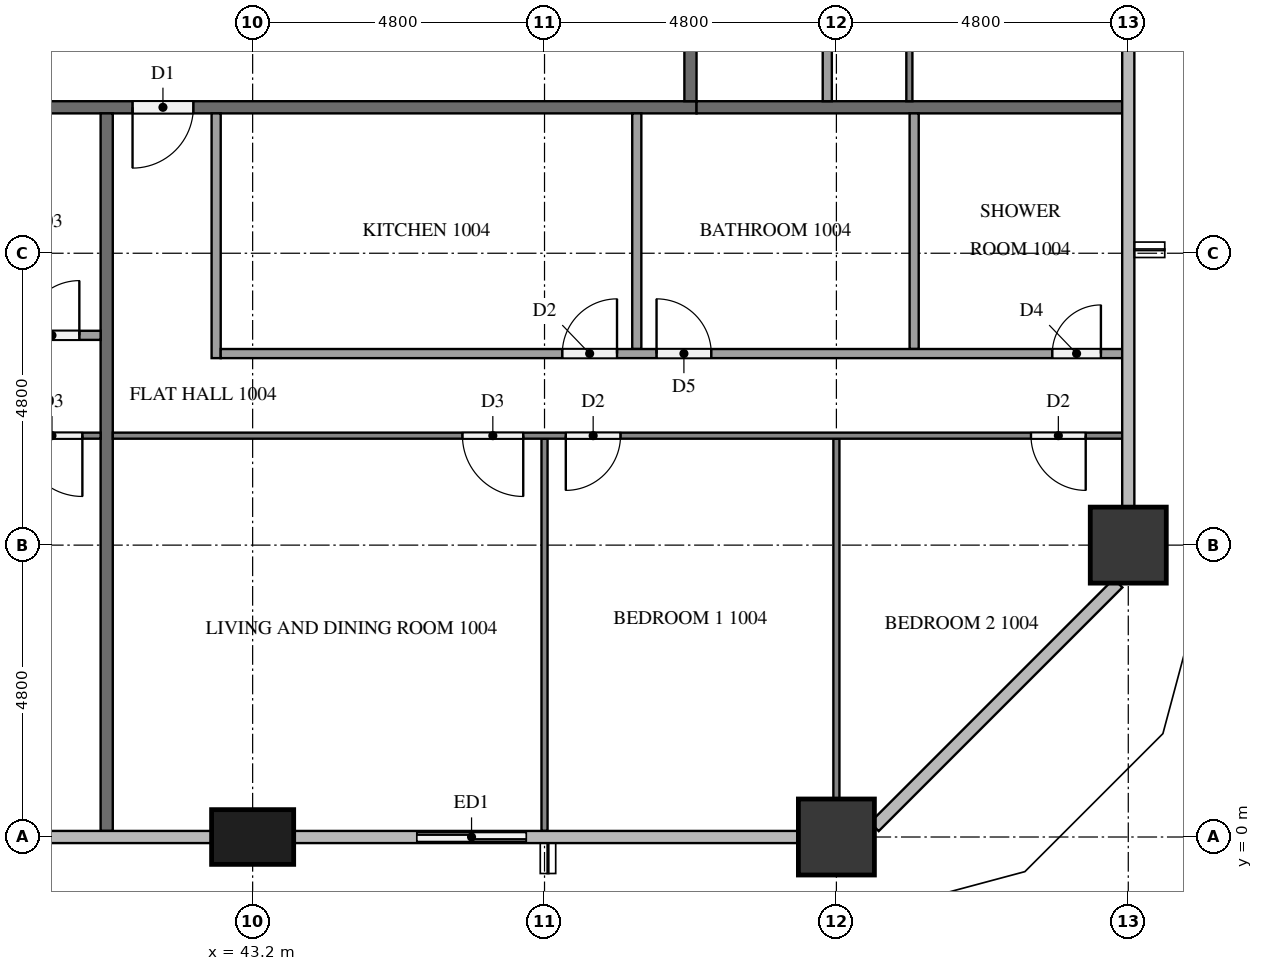
"""IFC4 building model, lengths in metres.
Left out: names, types, materials, properties, quantities, classifications, styles, units other than length and angle.
Written with IfcOpenShell. Run it as: python <this file> out.ifc"""

import sys

from ifc_helpers import new_model, si_unit, direction, frame, frame_2d, origin, origin_2d, place, context, subcontext, project, spatial, rectangle, extrude, element, fill, save


model = new_model("IFC4")
c1 = context("Model", 3, precision=1e-05, world=origin(), true_north=direction((0.0, 1.0)))
c2 = subcontext(c1, "Body", "Model", "MODEL_VIEW")
j1 = project(units=[si_unit("LENGTHUNIT", "METRE"), si_unit("PLANEANGLEUNIT", "RADIAN")], contexts=[c1])
p1 = place(None, origin())
s1 = spatial("IfcSite", under=j1, at=p1, CompositionType="ELEMENT")
p2 = place(p1, origin())
s2 = spatial("IfcBuilding", under=s1, at=p2, CompositionType="ELEMENT")
p3 = place(p2, frame((0.0, 0.0, 43.4)))
s3 = spatial("IfcBuildingStorey", under=s2, at=p3, CompositionType="ELEMENT", Elevation=43.4)
p4 = place(p3, frame((43.2, 0.0, 0.0), z_axis=(0.0, 0.0, 1.0), x_axis=(1.0, 0.0, 0.0)))
e1 = element("IfcColumn", 1, at=p4, inside=s3, PredefinedType="COLUMN", context=c2, shape_type="SweptSolid", body=[
    extrude(rectangle(XDim=1.35, YDim=0.9, at=origin_2d()), origin(), (0.0, 0.0, 1.0), 3.2),
])
for number, where, z_axis, x_axis in (
    (2, (52.8, 0.0, 0.0), (0.0, 0.0, 1.0), (1.0, 0.0, 0.0)),
    (3, (57.6, 4.8, 0.0), (0.0, 0.0, 1.0), (1.0, 0.0, 0.0)),
):
    element("IfcColumn", number, at=place(p3, frame(where, z_axis=z_axis, x_axis=x_axis)), inside=s3, PredefinedType="COLUMN", context=c2, shape_type="SweptSolid", body=[
        extrude(rectangle(XDim=1.25, YDim=1.25, at=origin_2d()), origin(), (0.0, 0.0, 1.0), 3.2),
    ])
p5 = place(p3, frame((45.6, 0.0, 0.0), z_axis=(0.0, 0.0, 1.0), x_axis=(1.0, 0.0, 0.0)))
e4 = element("IfcWall", 4, at=p5, inside=s3, PredefinedType="SOLIDWALL", context=c2, shape_type="SweptSolid", body=[
    extrude(rectangle(XDim=2.4, YDim=0.15, at=frame_2d((1.2, 0.0))), origin(), (0.0, 0.0, 1.0), 3.2),
])
p6 = place(p5, frame((0.3, 0.0, 0.0)))
e5 = element("IfcOpeningElement", 5, at=p6, cuts=e4, PredefinedType="OPENING", context=c2, shape_type="SweptSolid", body=[
    extrude(rectangle(XDim=1.8, YDim=2.4, at=frame_2d((0.9, 1.2))), frame((0.0, 0.085, 0.0), z_axis=(0.0, -1.0, 0.0), x_axis=(1.0, 0.0, 0.0)), (0.0, 0.0, 1.0), 0.17),
])
p7 = place(p3, frame((50.5, 12.0, 0.0), z_axis=(0.0, 0.0, 1.0), x_axis=(-1.0, 0.0, 0.0)))
e6 = element("IfcWall", 6, at=p7, inside=s3, PredefinedType="PARTITIONING", context=c2, shape_type="SweptSolid", body=[
    extrude(rectangle(XDim=38.6, YDim=0.2, at=frame_2d((19.3, 0.0))), origin(), (0.0, 0.0, 1.0), 3.2),
])
p8 = place(p7, frame((36.525, 0.0, 0.0)))
e7 = element("IfcOpeningElement", 7, at=p8, cuts=e6, PredefinedType="OPENING", context=c2, shape_type="SweptSolid", body=[
    extrude(rectangle(XDim=1.0, YDim=2.1, at=frame_2d((0.5, 1.05))), frame((0.0, 0.11, 0.0), z_axis=(0.0, -1.0, 0.0), x_axis=(1.0, 0.0, 0.0)), (0.0, 0.0, 1.0), 0.22),
])
p9 = place(p7, frame((24.525, 0.0, 0.0)))
e8 = element("IfcOpeningElement", 8, at=p9, cuts=e6, PredefinedType="OPENING", context=c2, shape_type="SweptSolid", body=[
    extrude(rectangle(XDim=1.0, YDim=2.1, at=frame_2d((0.5, 1.05))), frame((0.0, 0.11, 0.0), z_axis=(0.0, -1.0, 0.0), x_axis=(1.0, 0.0, 0.0)), (0.0, 0.0, 1.0), 0.22),
])
p10 = place(p7, frame((22.675, 0.0, 0.0)))
e9 = element("IfcOpeningElement", 9, at=p10, cuts=e6, PredefinedType="OPENING", context=c2, shape_type="SweptSolid", body=[
    extrude(rectangle(XDim=1.0, YDim=2.1, at=frame_2d((0.5, 1.05))), frame((0.0, 0.11, 0.0), z_axis=(0.0, -1.0, 0.0), x_axis=(1.0, 0.0, 0.0)), (0.0, 0.0, 1.0), 0.22),
])
p11 = place(p7, frame((8.275, 0.0, 0.0)))
e10 = element("IfcOpeningElement", 10, at=p11, cuts=e6, PredefinedType="OPENING", context=c2, shape_type="SweptSolid", body=[
    extrude(rectangle(XDim=1.0, YDim=2.1, at=frame_2d((0.5, 1.05))), frame((0.0, 0.11, 0.0), z_axis=(0.0, -1.0, 0.0), x_axis=(1.0, 0.0, 0.0)), (0.0, 0.0, 1.0), 0.22),
])
p12 = place(p3, frame((50.4, 40.7, 0.0), z_axis=(0.0, 0.0, 1.0), x_axis=(0.0, -1.0, 0.0)))
e11 = element("IfcWall", 11, at=p12, inside=s3, PredefinedType="PARTITIONING", context=c2, shape_type="SweptSolid", body=[
    extrude(rectangle(XDim=28.6, YDim=0.2, at=frame_2d((14.3, 0.0))), origin(), (0.0, 0.0, 1.0), 3.2),
])
p13 = place(p12, frame((17.125, 0.0, 0.0)))
e12 = element("IfcOpeningElement", 12, at=p13, cuts=e11, PredefinedType="OPENING", context=c2, shape_type="SweptSolid", body=[
    extrude(rectangle(XDim=1.0, YDim=2.1, at=frame_2d((0.5, 1.05))), frame((0.0, 0.11, 0.0), z_axis=(0.0, -1.0, 0.0), x_axis=(1.0, 0.0, 0.0)), (0.0, 0.0, 1.0), 0.22),
])
p14 = place(p12, frame((15.275, 0.0, 0.0)))
e13 = element("IfcOpeningElement", 13, at=p14, cuts=e11, PredefinedType="OPENING", context=c2, shape_type="SweptSolid", body=[
    extrude(rectangle(XDim=1.0, YDim=2.1, at=frame_2d((0.5, 1.05))), frame((0.0, 0.11, 0.0), z_axis=(0.0, -1.0, 0.0), x_axis=(1.0, 0.0, 0.0)), (0.0, 0.0, 1.0), 0.22),
])
p15 = place(p12, frame((5.675, 0.0, 0.0)))
e14 = element("IfcOpeningElement", 14, at=p15, cuts=e11, PredefinedType="OPENING", context=c2, shape_type="SweptSolid", body=[
    extrude(rectangle(XDim=1.0, YDim=2.1, at=frame_2d((0.5, 1.05))), frame((0.0, 0.11, 0.0), z_axis=(0.0, -1.0, 0.0), x_axis=(1.0, 0.0, 0.0)), (0.0, 0.0, 1.0), 0.22),
])
p16 = place(p3, frame((40.8, 11.9, 0.0), z_axis=(0.0, 0.0, 1.0), x_axis=(0.0, -1.0, 0.0)))
e15 = element("IfcWall", 15, at=p16, inside=s3, PredefinedType="PARTITIONING", context=c2, shape_type="SweptSolid", body=[
    extrude(rectangle(XDim=11.8, YDim=0.2, at=frame_2d((5.9, 0.0))), origin(), (0.0, 0.0, 1.0), 3.2),
])
p17 = place(p3, frame((50.5, 12.0, 0.0), z_axis=(0.0, 0.0, 1.0), x_axis=(1.0, 0.0, 0.0)))
e16 = element("IfcWall", 16, at=p17, inside=s3, PredefinedType="PARTITIONING", context=c2, shape_type="SweptSolid", body=[
    extrude(rectangle(XDim=7.0, YDim=0.2, at=frame_2d((3.5, 0.0))), origin(), (0.0, 0.0, 1.0), 3.2),
])
p18 = place(p3, frame((40.7, 6.6, 0.0), z_axis=(0.0, 0.0, 1.0), x_axis=(-1.0, 0.0, 0.0)))
e17 = element("IfcWall", 17, at=p18, inside=s3, PredefinedType="PARTITIONING", context=c2, shape_type="SweptSolid", body=[
    extrude(rectangle(XDim=14.2, YDim=0.1, at=frame_2d((7.1, 0.0))), origin(), (0.0, 0.0, 1.0), 3.2),
])
p19 = place(p18, frame((9.85, 0.0, 0.0)))
e18 = element("IfcOpeningElement", 18, at=p19, cuts=e17, PredefinedType="OPENING", context=c2, shape_type="SweptSolid", body=[
    extrude(rectangle(XDim=0.9, YDim=2.1, at=frame_2d((0.45, 1.05))), frame((0.0, 0.06, 0.0), z_axis=(0.0, -1.0, 0.0), x_axis=(1.0, 0.0, 0.0)), (0.0, 0.0, 1.0), 0.12),
])
p20 = place(p18, frame((8.25, 0.0, 0.0)))
e19 = element("IfcOpeningElement", 19, at=p20, cuts=e17, PredefinedType="OPENING", context=c2, shape_type="SweptSolid", body=[
    extrude(rectangle(XDim=0.9, YDim=2.1, at=frame_2d((0.45, 1.05))), frame((0.0, 0.06, 0.0), z_axis=(0.0, -1.0, 0.0), x_axis=(1.0, 0.0, 0.0)), (0.0, 0.0, 1.0), 0.12),
])
p21 = place(p18, frame((0.3, 0.0, 0.0)))
e20 = element("IfcOpeningElement", 20, at=p21, cuts=e17, PredefinedType="OPENING", context=c2, shape_type="SweptSolid", body=[
    extrude(rectangle(XDim=1.0, YDim=2.1, at=frame_2d((0.5, 1.05))), frame((0.0, 0.06, 0.0), z_axis=(0.0, -1.0, 0.0), x_axis=(1.0, 0.0, 0.0)), (0.0, 0.0, 1.0), 0.12),
])
p22 = place(p3, frame((28.275, 8.25, 0.0), z_axis=(0.0, 0.0, 1.0), x_axis=(1.0, 0.0, 0.0)))
e21 = element("IfcWall", 21, at=p22, inside=s3, PredefinedType="PARTITIONING", context=c2, shape_type="SweptSolid", body=[
    extrude(rectangle(XDim=12.425, YDim=0.15, at=frame_2d((6.212, 0.0))), origin(), (0.0, 0.0, 1.0), 3.2),
])
p23 = place(p22, frame((4.51, 0.0, 0.0)))
e22 = element("IfcOpeningElement", 22, at=p23, cuts=e21, PredefinedType="OPENING", context=c2, shape_type="SweptSolid", body=[
    extrude(rectangle(XDim=0.9, YDim=2.1, at=frame_2d((0.45, 1.05))), frame((0.0, 0.085, 0.0), z_axis=(0.0, -1.0, 0.0), x_axis=(1.0, 0.0, 0.0)), (0.0, 0.0, 1.0), 0.17),
])
p24 = place(p22, frame((6.06, 0.0, 0.0)))
e23 = element("IfcOpeningElement", 23, at=p24, cuts=e21, PredefinedType="OPENING", context=c2, shape_type="SweptSolid", body=[
    extrude(rectangle(XDim=0.8, YDim=2.1, at=frame_2d((0.4, 1.05))), frame((0.0, 0.085, 0.0), z_axis=(0.0, -1.0, 0.0), x_axis=(1.0, 0.0, 0.0)), (0.0, 0.0, 1.0), 0.17),
])
p25 = place(p22, frame((11.175, 0.0, 0.0)))
e24 = element("IfcOpeningElement", 24, at=p25, cuts=e21, PredefinedType="OPENING", context=c2, shape_type="SweptSolid", body=[
    extrude(rectangle(XDim=0.9, YDim=2.1, at=frame_2d((0.45, 1.05))), frame((0.0, 0.085, 0.0), z_axis=(0.0, -1.0, 0.0), x_axis=(1.0, 0.0, 0.0)), (0.0, 0.0, 1.0), 0.17),
])
p26 = place(p3, frame((48.0, 6.55, 0.0), z_axis=(0.0, 0.0, 1.0), x_axis=(0.0, -1.0, 0.0)))
e25 = element("IfcWall", 25, at=p26, inside=s3, PredefinedType="PARTITIONING", context=c2, shape_type="SweptSolid", body=[
    extrude(rectangle(XDim=6.45, YDim=0.1, at=frame_2d((3.225, 0.0))), origin(), (0.0, 0.0, 1.0), 3.2),
])
p27 = place(p3, frame((52.8, 6.55, 0.0), z_axis=(0.0, 0.0, 1.0), x_axis=(0.0, -1.0, 0.0)))
e26 = element("IfcWall", 26, at=p27, inside=s3, PredefinedType="PARTITIONING", context=c2, shape_type="SweptSolid", body=[
    extrude(rectangle(XDim=5.925, YDim=0.1, at=frame_2d((2.962, 0.0))), origin(), (0.0, 0.0, 1.0), 3.2),
])
p28 = place(p3, frame((57.5, 6.6, 0.0), z_axis=(0.0, 0.0, 1.0), x_axis=(-1.0, 0.0, 0.0)))
e27 = element("IfcWall", 27, at=p28, inside=s3, PredefinedType="PARTITIONING", context=c2, shape_type="SweptSolid", body=[
    extrude(rectangle(XDim=16.6, YDim=0.1, at=frame_2d((8.3, 0.0))), origin(), (0.0, 0.0, 1.0), 3.2),
])
p29 = place(p28, frame((9.85, 0.0, 0.0)))
e28 = element("IfcOpeningElement", 28, at=p29, cuts=e27, PredefinedType="OPENING", context=c2, shape_type="SweptSolid", body=[
    extrude(rectangle(XDim=1.0, YDim=2.1, at=frame_2d((0.5, 1.05))), frame((0.0, 0.06, 0.0), z_axis=(0.0, -1.0, 0.0), x_axis=(1.0, 0.0, 0.0)), (0.0, 0.0, 1.0), 0.12),
])
p30 = place(p28, frame((8.25, 0.0, 0.0)))
e29 = element("IfcOpeningElement", 29, at=p30, cuts=e27, PredefinedType="OPENING", context=c2, shape_type="SweptSolid", body=[
    extrude(rectangle(XDim=0.9, YDim=2.1, at=frame_2d((0.45, 1.05))), frame((0.0, 0.06, 0.0), z_axis=(0.0, -1.0, 0.0), x_axis=(1.0, 0.0, 0.0)), (0.0, 0.0, 1.0), 0.12),
])
p31 = place(p28, frame((0.6, 0.0, 0.0)))
e30 = element("IfcOpeningElement", 30, at=p31, cuts=e27, PredefinedType="OPENING", context=c2, shape_type="SweptSolid", body=[
    extrude(rectangle(XDim=0.9, YDim=2.1, at=frame_2d((0.45, 1.05))), frame((0.0, 0.06, 0.0), z_axis=(0.0, -1.0, 0.0), x_axis=(1.0, 0.0, 0.0)), (0.0, 0.0, 1.0), 0.12),
])
for number, where, z_axis, x_axis in (
    (31, (49.517, 11.9, 0.0), (0.0, 0.0, 1.0), (0.0, -1.0, 0.0)),
    (32, (54.079, 11.9, 0.0), (0.0, 0.0, 1.0), (0.0, -1.0, 0.0)),
):
    element("IfcWall", number, at=place(p3, frame(where, z_axis=z_axis, x_axis=x_axis)), inside=s3, PredefinedType="PARTITIONING", context=c2, shape_type="SweptSolid", body=[
        extrude(rectangle(XDim=3.875, YDim=0.15, at=frame_2d((1.938, 0.0))), origin(), (0.0, 0.0, 1.0), 3.2),
    ])
p32 = place(p3, frame((42.6, 11.9, 0.0), z_axis=(0.0, 0.0, 1.0), x_axis=(0.0, -1.0, 0.0)))
e33 = element("IfcWall", 33, at=p32, inside=s3, PredefinedType="PARTITIONING", context=c2, shape_type="SweptSolid", body=[
    extrude(rectangle(XDim=4.025, YDim=0.15, at=frame_2d((2.012, 0.0))), origin(), (0.0, 0.0, 1.0), 3.2),
])
p33 = place(p3, frame((42.675, 7.95, 0.0), z_axis=(0.0, 0.0, 1.0), x_axis=(1.0, 0.0, 0.0)))
e34 = element("IfcWall", 34, at=p33, inside=s3, PredefinedType="PARTITIONING", context=c2, shape_type="SweptSolid", body=[
    extrude(rectangle(XDim=14.825, YDim=0.15, at=frame_2d((7.413, 0.0))), origin(), (0.0, 0.0, 1.0), 3.2),
])
p34 = place(p33, frame((5.617, 0.0, 0.0)))
e35 = element("IfcOpeningElement", 35, at=p34, cuts=e34, PredefinedType="OPENING", context=c2, shape_type="SweptSolid", body=[
    extrude(rectangle(XDim=0.9, YDim=2.1, at=frame_2d((0.45, 1.05))), frame((0.0, 0.085, 0.0), z_axis=(0.0, -1.0, 0.0), x_axis=(1.0, 0.0, 0.0)), (0.0, 0.0, 1.0), 0.17),
])
p35 = place(p33, frame((7.167, 0.0, 0.0)))
e36 = element("IfcOpeningElement", 36, at=p35, cuts=e34, PredefinedType="OPENING", context=c2, shape_type="SweptSolid", body=[
    extrude(rectangle(XDim=0.9, YDim=2.1, at=frame_2d((0.45, 1.05))), frame((0.0, 0.085, 0.0), z_axis=(0.0, -1.0, 0.0), x_axis=(1.0, 0.0, 0.0)), (0.0, 0.0, 1.0), 0.17),
])
p36 = place(p33, frame((13.675, 0.0, 0.0)))
e37 = element("IfcOpeningElement", 37, at=p36, cuts=e34, PredefinedType="OPENING", context=c2, shape_type="SweptSolid", body=[
    extrude(rectangle(XDim=0.8, YDim=2.1, at=frame_2d((0.4, 1.05))), frame((0.0, 0.085, 0.0), z_axis=(0.0, -1.0, 0.0), x_axis=(1.0, 0.0, 0.0)), (0.0, 0.0, 1.0), 0.17),
])
p37 = place(p3, frame((54.0, 23.9, 0.0), z_axis=(0.0, 0.0, 1.0), x_axis=(0.0, -1.0, 0.0)))
e38 = element("IfcWall", 38, at=p37, inside=s3, PredefinedType="PARTITIONING", context=c2, shape_type="SweptSolid", body=[
    extrude(rectangle(XDim=11.8, YDim=0.1, at=frame_2d((5.9, 0.0))), origin(), (0.0, 0.0, 1.0), 3.2),
])
p38 = place(p37, frame((5.75, 0.0, 0.0)))
e39 = element("IfcOpeningElement", 39, at=p38, cuts=e38, PredefinedType="OPENING", context=c2, shape_type="SweptSolid", body=[
    extrude(rectangle(XDim=1.0, YDim=2.1, at=frame_2d((0.5, 1.05))), frame((0.0, 0.06, 0.0), z_axis=(0.0, -1.0, 0.0), x_axis=(1.0, 0.0, 0.0)), (0.0, 0.0, 1.0), 0.12),
])
p39 = place(p37, frame((7.45, 0.0, 0.0)))
e40 = element("IfcOpeningElement", 40, at=p39, cuts=e38, PredefinedType="OPENING", context=c2, shape_type="SweptSolid", body=[
    extrude(rectangle(XDim=0.9, YDim=2.1, at=frame_2d((0.45, 1.05))), frame((0.0, 0.06, 0.0), z_axis=(0.0, -1.0, 0.0), x_axis=(1.0, 0.0, 0.0)), (0.0, 0.0, 1.0), 0.12),
])
p40 = place(p3, frame((52.65, 12.1, 0.0), z_axis=(0.0, 0.0, 1.0), x_axis=(0.0, 1.0, 0.0)))
e41 = element("IfcWall", 41, at=p40, inside=s3, PredefinedType="PARTITIONING", context=c2, shape_type="SweptSolid", body=[
    extrude(rectangle(XDim=10.025, YDim=0.15, at=frame_2d((5.012, 0.0))), origin(), (0.0, 0.0, 1.0), 3.2),
])
p41 = place(p40, frame((6.34, 0.0, 0.0)))
e42 = element("IfcOpeningElement", 42, at=p41, cuts=e41, PredefinedType="OPENING", context=c2, shape_type="SweptSolid", body=[
    extrude(rectangle(XDim=0.8, YDim=2.1, at=frame_2d((0.4, 1.05))), frame((0.0, 0.085, 0.0), z_axis=(0.0, -1.0, 0.0), x_axis=(1.0, 0.0, 0.0)), (0.0, 0.0, 1.0), 0.17),
])
p42 = place(p40, frame((4.79, 0.0, 0.0)))
e43 = element("IfcOpeningElement", 43, at=p42, cuts=e41, PredefinedType="OPENING", context=c2, shape_type="SweptSolid", body=[
    extrude(rectangle(XDim=0.9, YDim=2.1, at=frame_2d((0.45, 1.05))), frame((0.0, 0.085, 0.0), z_axis=(0.0, -1.0, 0.0), x_axis=(1.0, 0.0, 0.0)), (0.0, 0.0, 1.0), 0.17),
])
p43 = place(p6, origin())
e44 = element("IfcDoor", 44, at=p43, inside=s3, OperationType="SLIDING_TO_LEFT", PredefinedType="DOOR", context=c2, shape_type="SweptSolid", body=[
    extrude(rectangle(XDim=1.8, YDim=2.4, at=frame_2d((0.9, 1.2))), frame((0.0, 0.025, 0.0), z_axis=(0.0, -1.0, 0.0), x_axis=(1.0, 0.0, 0.0)), (0.0, 0.0, 1.0), 0.05),
])
fill(e5, e44)
p44 = place(p11, origin())
e45 = element("IfcDoor", 45, at=p44, inside=s3, OperationType="SINGLE_SWING_RIGHT", PredefinedType="DOOR", context=c2, shape_type="SweptSolid", body=[
    extrude(rectangle(XDim=1.0, YDim=2.1, at=frame_2d((0.5, 1.05))), frame((0.0, 0.025, 0.0), z_axis=(0.0, -1.0, 0.0), x_axis=(1.0, 0.0, 0.0)), (0.0, 0.0, 1.0), 0.05),
])
fill(e10, e45)
p45 = place(p21, origin())
e46 = element("IfcDoor", 46, at=p45, inside=s3, OperationType="SINGLE_SWING_LEFT", PredefinedType="DOOR", context=c2, shape_type="SweptSolid", body=[
    extrude(rectangle(XDim=1.0, YDim=2.1, at=frame_2d((0.5, 1.05))), frame((0.0, 0.025, 0.0), z_axis=(0.0, -1.0, 0.0), x_axis=(1.0, 0.0, 0.0)), (0.0, 0.0, 1.0), 0.05),
])
fill(e20, e46)
p46 = place(p25, origin())
e47 = element("IfcDoor", 47, at=p46, inside=s3, OperationType="SINGLE_SWING_RIGHT", PredefinedType="DOOR", context=c2, shape_type="SweptSolid", body=[
    extrude(rectangle(XDim=0.9, YDim=2.1, at=frame_2d((0.45, 1.05))), frame((0.0, 0.025, 0.0), z_axis=(0.0, -1.0, 0.0), x_axis=(1.0, 0.0, 0.0)), (0.0, 0.0, 1.0), 0.05),
])
fill(e24, e47)
p47 = place(p29, origin())
e48 = element("IfcDoor", 48, at=p47, inside=s3, OperationType="SINGLE_SWING_LEFT", PredefinedType="DOOR", context=c2, shape_type="SweptSolid", body=[
    extrude(rectangle(XDim=1.0, YDim=2.1, at=frame_2d((0.5, 1.05))), frame((0.0, 0.025, 0.0), z_axis=(0.0, -1.0, 0.0), x_axis=(1.0, 0.0, 0.0)), (0.0, 0.0, 1.0), 0.05),
])
fill(e28, e48)
p48 = place(p30, origin())
e49 = element("IfcDoor", 49, at=p48, inside=s3, OperationType="SINGLE_SWING_RIGHT", PredefinedType="DOOR", context=c2, shape_type="SweptSolid", body=[
    extrude(rectangle(XDim=0.9, YDim=2.1, at=frame_2d((0.45, 1.05))), frame((0.0, 0.025, 0.0), z_axis=(0.0, -1.0, 0.0), x_axis=(1.0, 0.0, 0.0)), (0.0, 0.0, 1.0), 0.05),
])
fill(e29, e49)
p49 = place(p31, origin())
e50 = element("IfcDoor", 50, at=p49, inside=s3, OperationType="SINGLE_SWING_LEFT", PredefinedType="DOOR", context=c2, shape_type="SweptSolid", body=[
    extrude(rectangle(XDim=0.9, YDim=2.1, at=frame_2d((0.45, 1.05))), frame((0.0, 0.025, 0.0), z_axis=(0.0, -1.0, 0.0), x_axis=(1.0, 0.0, 0.0)), (0.0, 0.0, 1.0), 0.05),
])
fill(e30, e50)
p50 = place(p34, origin())
e51 = element("IfcDoor", 51, at=p50, inside=s3, OperationType="SINGLE_SWING_RIGHT", PredefinedType="DOOR", context=c2, shape_type="SweptSolid", body=[
    extrude(rectangle(XDim=0.9, YDim=2.1, at=frame_2d((0.45, 1.05))), frame((0.0, 0.025, 0.0), z_axis=(0.0, -1.0, 0.0), x_axis=(1.0, 0.0, 0.0)), (0.0, 0.0, 1.0), 0.05),
])
fill(e35, e51)
p51 = place(p35, origin())
e52 = element("IfcDoor", 52, at=p51, inside=s3, OperationType="SINGLE_SWING_LEFT", PredefinedType="DOOR", context=c2, shape_type="SweptSolid", body=[
    extrude(rectangle(XDim=0.9, YDim=2.1, at=frame_2d((0.45, 1.05))), frame((0.0, 0.025, 0.0), z_axis=(0.0, -1.0, 0.0), x_axis=(1.0, 0.0, 0.0)), (0.0, 0.0, 1.0), 0.05),
])
fill(e36, e52)
p52 = place(p36, origin())
e53 = element("IfcDoor", 53, at=p52, inside=s3, OperationType="SINGLE_SWING_RIGHT", PredefinedType="DOOR", context=c2, shape_type="SweptSolid", body=[
    extrude(rectangle(XDim=0.8, YDim=2.1, at=frame_2d((0.4, 1.05))), frame((0.0, 0.025, 0.0), z_axis=(0.0, -1.0, 0.0), x_axis=(1.0, 0.0, 0.0)), (0.0, 0.0, 1.0), 0.05),
])
fill(e37, e53)
save(model, sys.argv[1])
